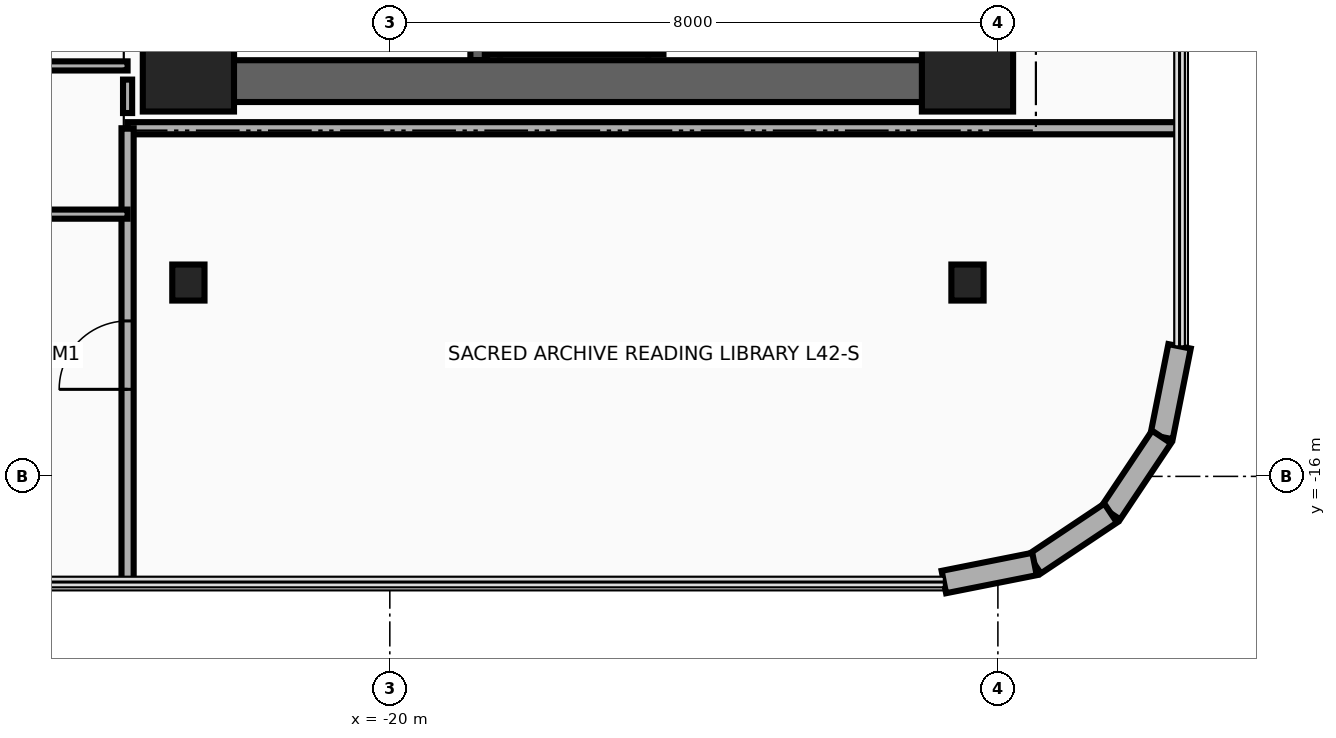
"""IFC4 building model, lengths in metres.
Left out: names, types, materials, properties, quantities, classifications, styles, units other than length and angle.
Written with IfcOpenShell. Run it as: python <this file> out.ifc"""

import sys

from ifc_helpers import new_model, si_unit, direction, frame, frame_2d, origin, origin_2d, place, context, subcontext, project, spatial, rectangle, i_section, extrude, source, transform, mapped, element, fill, save


model = new_model("IFC4")
c1 = context("Model", 3, precision=1e-05, world=origin(), true_north=direction((0.0, 1.0)))
c2 = subcontext(c1, "Body", "Model", "MODEL_VIEW")
j1 = project(units=[si_unit("LENGTHUNIT", "METRE"), si_unit("PLANEANGLEUNIT", "RADIAN")], contexts=[c1])
p1 = place(None, origin())
s1 = spatial("IfcSite", under=j1, at=p1, CompositionType="ELEMENT")
p2 = place(p1, origin())
s2 = spatial("IfcBuilding", under=s1, at=p2, CompositionType="ELEMENT")
p3 = place(p2, frame((0.0, 0.0, 164.9)))
s3 = spatial("IfcBuildingStorey", under=s2, at=p3, CompositionType="ELEMENT", Elevation=164.9)
for number, where, z_axis, x_axis in (
    (1, (-22.16, -10.525, 0.0), (0.0, 0.0, 1.0), (0.0, 1.0, 0.0)),
    (2, (-18.83, -10.525, 0.0), (0.0, 0.0, 1.0), (0.0, 1.0, 0.0)),
):
    element("IfcWall", number, at=place(p3, frame(where, z_axis=z_axis, x_axis=x_axis)), inside=s3, PredefinedType="SHEAR", context=c2, shape_type="SweptSolid", body=[
        extrude(rectangle(XDim=8.745, YDim=0.22, at=frame_2d((4.373, 0.0))), origin(), (0.0, 0.0, 1.0), 3.46),
    ])
p4 = place(p3, frame((-22.65, -11.075, 0.0), z_axis=(0.0, 0.0, 1.0), x_axis=(0.0, 1.0, 0.0)))
e3 = element("IfcWall", 3, at=p4, inside=s3, PredefinedType="SHEAR", context=c2, shape_type="SweptSolid", body=[
    extrude(rectangle(XDim=22.15, YDim=0.55, at=frame_2d((11.075, 0.0))), origin(), (0.0, 0.0, 1.0), 3.46),
])
p5 = place(p3, frame((-22.65, -10.8, 0.0), z_axis=(0.0, 0.0, 1.0), x_axis=(1.0, 0.0, 0.0)))
e4 = element("IfcWall", 4, at=p5, inside=s3, PredefinedType="SHEAR", context=c2, shape_type="SweptSolid", body=[
    extrude(rectangle(XDim=10.25, YDim=0.55, at=frame_2d((5.125, 0.0))), origin(), (0.0, 0.0, 1.0), 3.46),
])
m1 = source(origin(), c2, "Body", "SweptSolid", [
    extrude(rectangle(XDim=1.2, YDim=1.2, at=origin_2d()), origin(), (0.0, 0.0, 1.0), 3.7),
])
for number, where, z_axis, x_axis in (
    (5, (-22.65, -10.6, 0.0), (0.0, 0.0, 1.0), (1.0, 0.0, 0.0)),
    (6, (-12.4, -10.6, 0.0), (0.0, 0.0, 1.0), (1.0, 0.0, 0.0)),
):
    element("IfcColumn", number, at=place(p3, frame(where, z_axis=z_axis, x_axis=x_axis)), inside=s3, PredefinedType="COLUMN", context=c2, shape_type="MappedRepresentation", body=[
        mapped(m1, transform((0.0, 0.0, 0.0), x_axis=(1.0, 0.0, 0.0), y_axis=(0.0, 1.0, 0.0), z_axis=(0.0, 0.0, 1.0), scale=1.0)),
    ])
m2 = source(origin(), c2, "Body", "SweptSolid", [
    extrude(i_section(OverallWidth=0.424, OverallDepth=0.474, WebThickness=0.048, FlangeThickness=0.077, at=origin_2d()), origin(), (0.0, 0.0, 1.0), 3.7),
])
for number, where, z_axis, x_axis in (
    (7, (-22.65, -13.45, 0.0), (0.0, 0.0, 1.0), (1.0, 0.0, 0.0)),
    (8, (-12.4, -13.45, 0.0), (0.0, 0.0, 1.0), (1.0, 0.0, 0.0)),
):
    element("IfcColumn", number, at=place(p3, frame(where, z_axis=z_axis, x_axis=x_axis)), inside=s3, PredefinedType="COLUMN", context=c2, shape_type="MappedRepresentation", body=[
        mapped(m2, transform((0.0, 0.0, 0.0), x_axis=(1.0, 0.0, 0.0), y_axis=(0.0, 1.0, 0.0), z_axis=(0.0, 0.0, 1.0), scale=1.0)),
    ])
p6 = place(p3, frame((-9.61, -14.289, 0.0), z_axis=(0.0, 0.0, 1.0), x_axis=(-0.194996050505, -0.980804027463, 0.0)))
e9 = element("IfcWall", 9, at=p6, inside=s3, PredefinedType="SOLIDWALL", context=c2, shape_type="SweptSolid", body=[
    extrude(rectangle(XDim=1.216, YDim=0.3, at=frame_2d((0.608, 0.0))), origin(), (0.0, 0.0, 1.0), 3.46),
])
for number, where, z_axis, x_axis in (
    (10, (-9.847, -15.482, 0.0), (0.0, 0.0, 1.0), (-0.556, -0.831, 0.0)),
    (11, (-10.517, -16.483, 0.0), (0.0, 0.0, 1.0), (-0.831, -0.556, 0.0)),
):
    element("IfcWall", number, at=place(p3, frame(where, z_axis=z_axis, x_axis=x_axis)), inside=s3, PredefinedType="SOLIDWALL", context=c2, shape_type="SweptSolid", body=[
        extrude(rectangle(XDim=1.205, YDim=0.3, at=frame_2d((0.603, 0.0))), origin(), (0.0, 0.0, 1.0), 3.46),
    ])
p7 = place(p3, frame((-11.518, -17.153, 0.0), z_axis=(0.0, 0.0, 1.0), x_axis=(-0.980804027463, -0.194996050505, 0.0)))
e12 = element("IfcWall", 12, at=p7, inside=s3, PredefinedType="SOLIDWALL", context=c2, shape_type="SweptSolid", body=[
    extrude(rectangle(XDim=1.216, YDim=0.3, at=frame_2d((0.608, 0.0))), origin(), (0.0, 0.0, 1.0), 3.46),
])
for number, where, z_axis, x_axis in (
    (13, (-18.65, -10.45, 0.0), (0.0, 0.0, 1.0), (0.0, 1.0, 0.0)),
    (14, (-16.5, -10.45, 0.0), (0.0, 0.0, 1.0), (0.0, 1.0, 0.0)),
):
    element("IfcWall", number, at=place(p3, frame(where, z_axis=z_axis, x_axis=x_axis)), inside=s3, PredefinedType="MOVABLE", context=c2, shape_type="SweptSolid", body=[
        extrude(rectangle(XDim=2.35, YDim=0.2, at=frame_2d((1.175, 0.0))), origin(), (0.0, 0.0, 1.0), 2.666),
    ])
p8 = place(p3, frame((-18.55, -10.35, 0.0), z_axis=(0.0, 0.0, 1.0), x_axis=(1.0, 0.0, 0.0)))
e15 = element("IfcWall", 15, at=p8, inside=s3, PredefinedType="MOVABLE", context=c2, shape_type="SweptSolid", body=[
    extrude(rectangle(XDim=1.95, YDim=0.2, at=frame_2d((0.975, 0.0))), origin(), (0.0, 0.0, 1.0), 2.666),
])
p9 = place(p3, frame((-23.45, -11.42, 0.0), z_axis=(0.0, 0.0, 1.0), x_axis=(1.0, 0.0, 0.0)))
e16 = element("IfcWall", 16, at=p9, inside=s3, PredefinedType="PARTITIONING", context=c2, shape_type="SweptSolid", body=[
    extrude(rectangle(XDim=13.84, YDim=0.16, at=frame_2d((6.92, 0.0))), origin(), (0.0, 0.0, 1.0), 2.834),
])
p10 = place(p3, frame((-23.45, -17.39, 0.0), z_axis=(0.0, 0.0, 1.0), x_axis=(0.0, 1.0, 0.0)))
e17 = element("IfcWall", 17, at=p10, inside=s3, PredefinedType="PARTITIONING", context=c2, shape_type="SweptSolid", body=[
    extrude(rectangle(XDim=5.97, YDim=0.16, at=frame_2d((2.985, 0.0))), origin(), (0.0, 0.0, 1.0), 3.46),
])
p11 = place(p10, frame((2.535, 0.0, 0.0)))
e18 = element("IfcOpeningElement", 18, at=p11, cuts=e17, PredefinedType="OPENING", context=c2, shape_type="SweptSolid", body=[
    extrude(rectangle(XDim=0.9, YDim=2.1, at=frame_2d((0.45, 1.05))), frame((0.0, 0.095, 0.0), z_axis=(0.0, -1.0, 0.0), x_axis=(1.0, 0.0, 0.0)), (0.0, 0.0, 1.0), 0.19),
])
p12 = place(p3, frame((-26.708, -10.6, 0.0), z_axis=(0.0, 0.0, 1.0), x_axis=(1.0, 0.0, 0.0)))
e19 = element("IfcWall", 19, at=p12, inside=s3, PredefinedType="PARTITIONING", context=c2, shape_type="SweptSolid", body=[
    extrude(rectangle(XDim=3.259, YDim=0.12, at=frame_2d((1.629, 0.0))), origin(), (0.0, 0.0, 1.0), 2.666),
])
p13 = place(p3, frame((-26.708, -12.55, 0.0), z_axis=(0.0, 0.0, 1.0), x_axis=(1.0, 0.0, 0.0)))
e20 = element("IfcWall", 20, at=p13, inside=s3, PredefinedType="PARTITIONING", context=c2, shape_type="SweptSolid", body=[
    extrude(rectangle(XDim=3.259, YDim=0.12, at=frame_2d((1.629, 0.0))), origin(), (0.0, 0.0, 1.0), 3.46),
])
p14 = place(p3, frame((-23.45, -11.22, 0.0), z_axis=(0.0, 0.0, 1.0), x_axis=(0.0, 1.0, 0.0)))
e21 = element("IfcWall", 21, at=p14, inside=s3, PredefinedType="PARTITIONING", context=c2, shape_type="SweptSolid", body=[
    extrude(rectangle(XDim=0.44, YDim=0.12, at=frame_2d((0.22, 0.0))), origin(), (0.0, 0.0, 1.0), 2.666),
])
p15 = place(p11, origin())
e22 = element("IfcDoor", 22, at=p15, inside=s3, OperationType="SINGLE_SWING_RIGHT", PredefinedType="DOOR", context=c2, shape_type="SweptSolid", body=[
    extrude(rectangle(XDim=0.9, YDim=2.1, at=frame_2d((0.45, 1.05))), frame((0.0, 0.025, 0.0), z_axis=(0.0, -1.0, 0.0), x_axis=(1.0, 0.0, 0.0)), (0.0, 0.0, 1.0), 0.05),
])
fill(e18, e22)
save(model, sys.argv[1])
